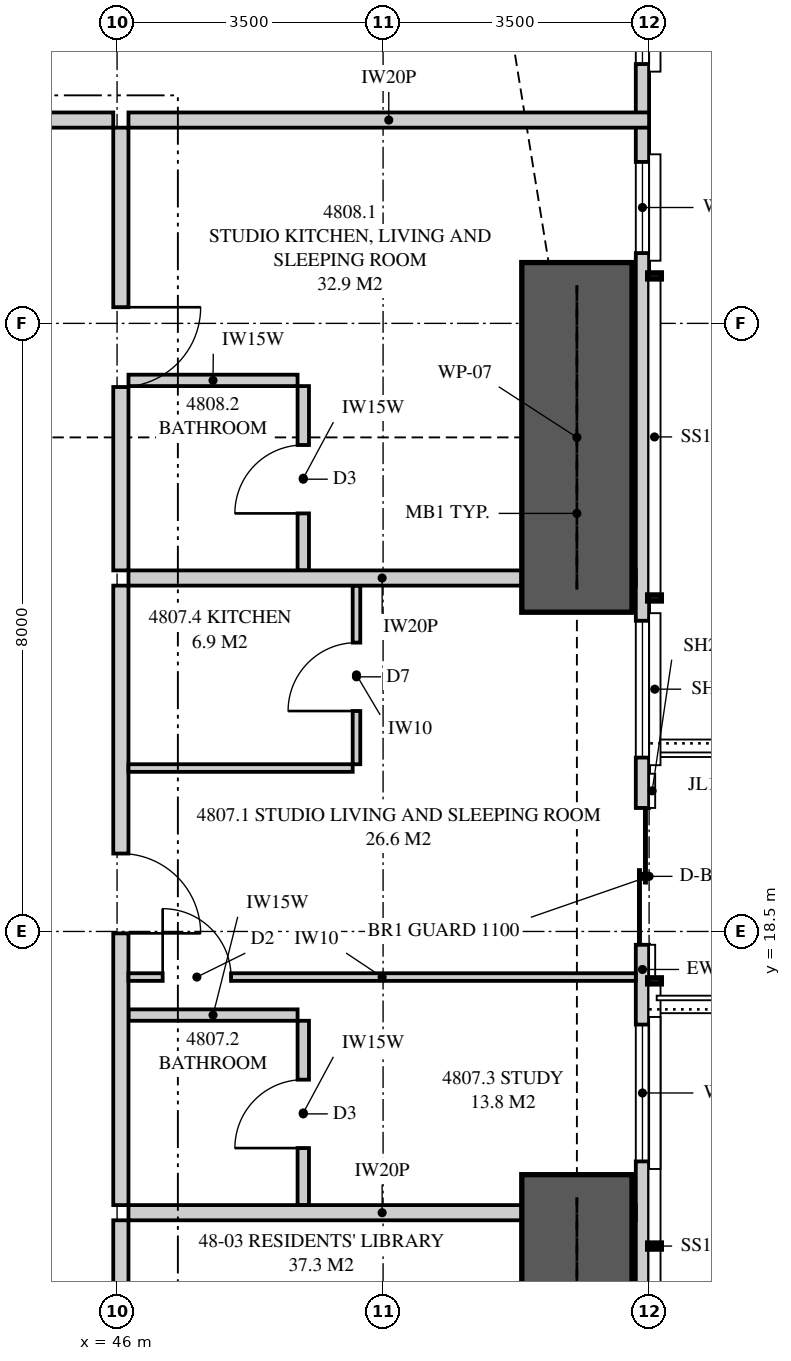
"""IFC4 building model, lengths in metres.
Left out: names, types, materials, properties, quantities, classifications, styles, units other than length and angle.
Written with IfcOpenShell. Run it as: python <this file> out.ifc"""

import sys

from ifc_helpers import new_model, si_unit, direction, frame, frame_2d, origin, place, context, subcontext, project, spatial, polyline, rectangle, outline, extrude, element, fill, save


model = new_model("IFC4")
c1 = context("Model", 3, precision=1e-05, world=origin(), true_north=direction((0.0, 1.0)))
c2 = subcontext(c1, "Body", "Model", "MODEL_VIEW")
j1 = project(units=[si_unit("LENGTHUNIT", "METRE"), si_unit("PLANEANGLEUNIT", "RADIAN")], contexts=[c1])
p1 = place(None, origin())
s1 = spatial("IfcSite", under=j1, at=p1, CompositionType="ELEMENT")
p2 = place(p1, origin())
s2 = spatial("IfcBuilding", under=s1, at=p2, CompositionType="ELEMENT")
p3 = place(p2, frame((0.0, 0.0, 177.8)))
s3 = spatial("IfcBuildingStorey", under=s2, at=p3, CompositionType="ELEMENT", Elevation=177.8)
p4 = place(p3, frame((52.913, 3.051, 0.0), z_axis=(0.0, 0.0, 1.0), x_axis=(0.0, 1.0, 0.0)))
e1 = element("IfcWall", 1, at=p4, inside=s3, PredefinedType="SOLIDWALL", context=c2, shape_type="SweptSolid", body=[
    extrude(outline(polyline([(0.0, 0.0), (29.897, 0.0), (29.897, 3.11), (22.167, 3.11), (22.167, 2.15), (22.074, 2.15), (22.074, 3.11), (21.949, 3.11), (21.949, 2.15), (9.949, 2.15), (9.949, 3.11), (9.847, 3.11), (9.847, 2.15), (9.706, 2.15), (9.706, 3.11), (0.0, 3.11), (0.0, 0.0)])), frame((0.0, 0.087, 0.0), z_axis=(0.0, -1.0, 0.0), x_axis=(1.0, 0.0, 0.0)), (0.0, 0.0, 1.0), 0.175),
])
p5 = place(p4, frame((1.797, 0.0, 0.4)))
e2 = element("IfcOpeningElement", 2, at=p5, cuts=e1, PredefinedType="OPENING", context=c2, shape_type="SweptSolid", body=[
    extrude(rectangle(XDim=1.8, YDim=1.7, at=frame_2d((0.9, 0.85))), frame((0.0, 0.097, 0.0), z_axis=(0.0, -1.0, 0.0), x_axis=(1.0, 0.0, 0.0)), (0.0, 0.0, 1.0), 0.195),
])
p6 = place(p4, frame((6.321, 0.0, 0.4)))
e3 = element("IfcOpeningElement", 3, at=p6, cuts=e1, PredefinedType="OPENING", context=c2, shape_type="SweptSolid", body=[
    extrude(rectangle(XDim=1.2, YDim=1.7, at=frame_2d((0.6, 0.85))), frame((0.0, 0.097, 0.0), z_axis=(0.0, -1.0, 0.0), x_axis=(1.0, 0.0, 0.0)), (0.0, 0.0, 1.0), 0.195),
])
p7 = place(p4, frame((12.424, 0.0, 0.4)))
e4 = element("IfcOpeningElement", 4, at=p7, cuts=e1, PredefinedType="OPENING", context=c2, shape_type="SweptSolid", body=[
    extrude(rectangle(XDim=1.8, YDim=1.7, at=frame_2d((0.9, 0.85))), frame((0.0, 0.097, 0.0), z_axis=(0.0, -1.0, 0.0), x_axis=(1.0, 0.0, 0.0)), (0.0, 0.0, 1.0), 0.195),
])
p8 = place(p4, frame((15.274, 0.0, 0.0)))
e5 = element("IfcOpeningElement", 5, at=p8, cuts=e1, PredefinedType="OPENING", context=c2, shape_type="SweptSolid", body=[
    extrude(rectangle(XDim=1.8, YDim=2.1, at=frame_2d((0.9, 1.05))), frame((0.0, 0.097, 0.0), z_axis=(0.0, -1.0, 0.0), x_axis=(1.0, 0.0, 0.0)), (0.0, 0.0, 1.0), 0.195),
])
p9 = place(p4, frame((17.736, 0.0, 0.4)))
e6 = element("IfcOpeningElement", 6, at=p9, cuts=e1, PredefinedType="OPENING", context=c2, shape_type="SweptSolid", body=[
    extrude(rectangle(XDim=1.8, YDim=1.7, at=frame_2d((0.9, 0.85))), frame((0.0, 0.097, 0.0), z_axis=(0.0, -1.0, 0.0), x_axis=(1.0, 0.0, 0.0)), (0.0, 0.0, 1.0), 0.195),
])
p10 = place(p4, frame((24.373, 0.0, 0.4)))
e7 = element("IfcOpeningElement", 7, at=p10, cuts=e1, PredefinedType="OPENING", context=c2, shape_type="SweptSolid", body=[
    extrude(rectangle(XDim=1.2, YDim=1.7, at=frame_2d((0.6, 0.85))), frame((0.0, 0.097, 0.0), z_axis=(0.0, -1.0, 0.0), x_axis=(1.0, 0.0, 0.0)), (0.0, 0.0, 1.0), 0.195),
])
p11 = place(p4, frame((26.861, 0.0, 0.4)))
e8 = element("IfcOpeningElement", 8, at=p11, cuts=e1, PredefinedType="OPENING", context=c2, shape_type="SweptSolid", body=[
    extrude(rectangle(XDim=2.4, YDim=1.7, at=frame_2d((1.2, 0.85))), frame((0.0, 0.097, 0.0), z_axis=(0.0, -1.0, 0.0), x_axis=(1.0, 0.0, 0.0)), (0.0, 0.0, 1.0), 0.195),
])
p12 = place(p3, frame((24.05, 29.175, 0.0), z_axis=(0.0, 0.0, 1.0), x_axis=(1.0, 0.0, 0.0)))
e9 = element("IfcWall", 9, at=p12, inside=s3, PredefinedType="PARTITIONING", context=c2, shape_type="SweptSolid", body=[
    extrude(outline(polyline([(0.0, 0.0), (21.9, 0.0), (21.9, 3.11), (19.037, 3.11), (19.037, 2.541), (18.363, 2.541), (18.363, 3.11), (8.787, 3.11), (8.787, 2.541), (8.113, 2.541), (8.113, 3.11), (0.0, 3.11), (0.0, 0.0)])), frame((0.0, 0.1, 0.0), z_axis=(0.0, -1.0, 0.0), x_axis=(1.0, 0.0, 0.0)), (0.0, 0.0, 1.0), 0.2),
])
p13 = place(p12, frame((13.925, 0.0, 0.0)))
e10 = element("IfcOpeningElement", 10, at=p13, cuts=e9, PredefinedType="OPENING", context=c2, shape_type="SweptSolid", body=[
    extrude(rectangle(XDim=1.05, YDim=2.2, at=frame_2d((0.525, 1.1))), frame((0.0, 0.11, 0.0), z_axis=(0.0, -1.0, 0.0), x_axis=(1.0, 0.0, 0.0)), (0.0, 0.0, 1.0), 0.22),
])
p14 = place(p3, frame((46.15, 29.175, 0.0), z_axis=(0.0, 0.0, 1.0), x_axis=(1.0, 0.0, 0.0)))
e11 = element("IfcWall", 11, at=p14, inside=s3, PredefinedType="PARTITIONING", context=c2, shape_type="SweptSolid", body=[
    extrude(outline(polyline([(0.0, 0.0), (6.85, 0.0), (6.85, 3.11), (6.147, 3.11), (6.147, 2.15), (4.303, 2.15), (4.303, 3.11), (0.0, 3.11), (0.0, 0.0)])), frame((0.0, 0.1, 0.0), z_axis=(0.0, -1.0, 0.0), x_axis=(1.0, 0.0, 0.0)), (0.0, 0.0, 1.0), 0.2),
])
p15 = place(p3, frame((52.825, 14.8, 0.0), z_axis=(0.0, 0.0, 1.0), x_axis=(-1.0, 0.0, 0.0)))
e12 = element("IfcWall", 12, at=p15, inside=s3, PredefinedType="PARTITIONING", context=c2, shape_type="SweptSolid", body=[
    extrude(outline(polyline([(0.529, 2.15), (0.0, 2.15), (0.0, 0.0), (0.529, 0.0), (0.529, 0.039), (1.021, 0.039), (1.021, 0.0), (6.675, 0.0), (6.675, 3.11), (1.685, 3.11), (1.685, 2.15), (1.021, 2.15), (1.021, 2.111), (0.529, 2.111), (0.529, 2.15)])), frame((0.0, 0.1, 0.0), z_axis=(0.0, -1.0, 0.0), x_axis=(1.0, 0.0, 0.0)), (0.0, 0.0, 1.0), 0.2),
])
p16 = place(p3, frame((52.825, 23.15, 0.0), z_axis=(0.0, 0.0, 1.0), x_axis=(-1.0, 0.0, 0.0)))
e13 = element("IfcWall", 13, at=p16, inside=s3, PredefinedType="PARTITIONING", context=c2, shape_type="SweptSolid", body=[
    extrude(outline(polyline([(0.0, 0.0), (6.675, 0.0), (6.675, 3.11), (1.685, 3.11), (1.685, 2.15), (0.0, 2.15), (0.0, 3.11), (0.0, 0.0)])), frame((0.0, 0.1, 0.0), z_axis=(0.0, -1.0, 0.0), x_axis=(1.0, 0.0, 0.0)), (0.0, 0.0, 1.0), 0.2),
])
p17 = place(p3, frame((46.05, 14.9, 0.0), z_axis=(0.0, 0.0, 1.0), x_axis=(0.0, 1.0, 0.0)))
e14 = element("IfcWall", 14, at=p17, inside=s3, PredefinedType="PARTITIONING", context=c2, shape_type="SweptSolid", body=[
    extrude(rectangle(XDim=8.15, YDim=0.2, at=frame_2d((4.075, 0.0))), origin(), (0.0, 0.0, 1.0), 3.11),
])
p18 = place(p17, frame((3.575, 0.0, 0.0)))
e15 = element("IfcOpeningElement", 15, at=p18, cuts=e14, PredefinedType="OPENING", context=c2, shape_type="SweptSolid", body=[
    extrude(rectangle(XDim=1.05, YDim=2.2, at=frame_2d((0.525, 1.1))), frame((0.0, 0.11, 0.0), z_axis=(0.0, -1.0, 0.0), x_axis=(1.0, 0.0, 0.0)), (0.0, 0.0, 1.0), 0.22),
])
p19 = place(p3, frame((48.45, 14.9, 0.0), z_axis=(0.0, 0.0, 1.0), x_axis=(0.0, 1.0, 0.0)))
e16 = element("IfcWall", 16, at=p19, inside=s3, PredefinedType="PLUMBINGWALL", context=c2, shape_type="SweptSolid", body=[
    extrude(rectangle(XDim=2.425, YDim=0.15, at=frame_2d((1.212, 0.0))), origin(), (0.0, 0.0, 1.0), 3.11),
])
p20 = place(p19, frame((0.75, 0.0, 0.0)))
e17 = element("IfcOpeningElement", 17, at=p20, cuts=e16, PredefinedType="OPENING", context=c2, shape_type="SweptSolid", body=[
    extrude(rectangle(XDim=0.9, YDim=2.1, at=frame_2d((0.45, 1.05))), frame((0.0, 0.085, 0.0), z_axis=(0.0, -1.0, 0.0), x_axis=(1.0, 0.0, 0.0)), (0.0, 0.0, 1.0), 0.17),
])
p21 = place(p3, frame((48.375, 17.4, 0.0), z_axis=(0.0, 0.0, 1.0), x_axis=(-1.0, 0.0, 0.0)))
e18 = element("IfcWall", 18, at=p21, inside=s3, PredefinedType="PLUMBINGWALL", context=c2, shape_type="SweptSolid", body=[
    extrude(rectangle(XDim=2.225, YDim=0.15, at=frame_2d((1.113, 0.0))), origin(), (0.0, 0.0, 1.0), 3.11),
])
p22 = place(p3, frame((52.825, 17.9, 0.0), z_axis=(0.0, 0.0, 1.0), x_axis=(-1.0, 0.0, 0.0)))
e19 = element("IfcWall", 19, at=p22, inside=s3, PredefinedType="PARTITIONING", context=c2, shape_type="SweptSolid", body=[
    extrude(outline(polyline([(0.0, 0.0), (6.675, 0.0), (6.675, 3.11), (1.635, 3.11), (1.635, 2.15), (0.0, 2.15), (0.0, 3.11), (0.0, 0.0)])), frame((0.0, 0.05, 0.0), z_axis=(0.0, -1.0, 0.0), x_axis=(1.0, 0.0, 0.0)), (0.0, 0.0, 1.0), 0.1),
])
p23 = place(p22, frame((5.325, 0.0, 0.0)))
e20 = element("IfcOpeningElement", 20, at=p23, cuts=e19, PredefinedType="OPENING", context=c2, shape_type="SweptSolid", body=[
    extrude(rectangle(XDim=0.9, YDim=2.1, at=frame_2d((0.45, 1.05))), frame((0.0, 0.06, 0.0), z_axis=(0.0, -1.0, 0.0), x_axis=(1.0, 0.0, 0.0)), (0.0, 0.0, 1.0), 0.12),
])
p24 = place(p3, frame((49.15, 20.7, 0.0), z_axis=(0.0, 0.0, 1.0), x_axis=(0.0, 1.0, 0.0)))
e21 = element("IfcWall", 21, at=p24, inside=s3, PredefinedType="PARTITIONING", context=c2, shape_type="SweptSolid", body=[
    extrude(rectangle(XDim=2.35, YDim=0.1, at=frame_2d((1.175, 0.0))), origin(), (0.0, 0.0, 1.0), 3.11),
])
p25 = place(p24, frame((0.7, 0.0, 0.0)))
e22 = element("IfcOpeningElement", 22, at=p25, cuts=e21, PredefinedType="OPENING", context=c2, shape_type="SweptSolid", body=[
    extrude(rectangle(XDim=0.9, YDim=2.1, at=frame_2d((0.45, 1.05))), frame((0.0, 0.06, 0.0), z_axis=(0.0, -1.0, 0.0), x_axis=(1.0, 0.0, 0.0)), (0.0, 0.0, 1.0), 0.12),
])
p26 = place(p3, frame((49.1, 20.65, 0.0), z_axis=(0.0, 0.0, 1.0), x_axis=(-1.0, 0.0, 0.0)))
e23 = element("IfcWall", 23, at=p26, inside=s3, PredefinedType="PARTITIONING", context=c2, shape_type="SweptSolid", body=[
    extrude(rectangle(XDim=2.95, YDim=0.1, at=frame_2d((1.475, 0.0))), origin(), (0.0, 0.0, 1.0), 3.11),
])
p27 = place(p3, frame((46.05, 23.25, 0.0), z_axis=(0.0, 0.0, 1.0), x_axis=(0.0, 1.0, 0.0)))
e24 = element("IfcWall", 24, at=p27, inside=s3, PredefinedType="PARTITIONING", context=c2, shape_type="SweptSolid", body=[
    extrude(outline(polyline([(0.0, 0.0), (5.825, 0.0), (5.825, 3.11), (2.087, 3.11), (2.087, 2.541), (1.413, 2.541), (1.413, 3.11), (0.0, 3.11), (0.0, 0.0)])), frame((0.0, 0.1, 0.0), z_axis=(0.0, -1.0, 0.0), x_axis=(1.0, 0.0, 0.0)), (0.0, 0.0, 1.0), 0.2),
])
p28 = place(p27, frame((2.413, 0.0, 0.0)))
e25 = element("IfcOpeningElement", 25, at=p28, cuts=e24, PredefinedType="OPENING", context=c2, shape_type="SweptSolid", body=[
    extrude(rectangle(XDim=1.05, YDim=2.2, at=frame_2d((0.525, 1.1))), frame((0.0, 0.11, 0.0), z_axis=(0.0, -1.0, 0.0), x_axis=(1.0, 0.0, 0.0)), (0.0, 0.0, 1.0), 0.22),
])
p29 = place(p3, frame((48.45, 23.25, 0.0), z_axis=(0.0, 0.0, 1.0), x_axis=(0.0, 1.0, 0.0)))
e26 = element("IfcWall", 26, at=p29, inside=s3, PredefinedType="PLUMBINGWALL", context=c2, shape_type="SweptSolid", body=[
    extrude(outline(polyline([(0.0, 0.0), (2.425, 0.0), (2.425, 3.11), (2.062, 3.11), (2.062, 2.541), (1.438, 2.541), (1.438, 3.11), (0.0, 3.11), (0.0, 0.0)])), frame((0.0, 0.075, 0.0), z_axis=(0.0, -1.0, 0.0), x_axis=(1.0, 0.0, 0.0)), (0.0, 0.0, 1.0), 0.15),
])
p30 = place(p29, frame((0.75, 0.0, 0.0)))
e27 = element("IfcOpeningElement", 27, at=p30, cuts=e26, PredefinedType="OPENING", context=c2, shape_type="SweptSolid", body=[
    extrude(rectangle(XDim=0.9, YDim=2.1, at=frame_2d((0.45, 1.05))), frame((0.0, 0.085, 0.0), z_axis=(0.0, -1.0, 0.0), x_axis=(1.0, 0.0, 0.0)), (0.0, 0.0, 1.0), 0.17),
])
p31 = place(p3, frame((48.375, 25.75, 0.0), z_axis=(0.0, 0.0, 1.0), x_axis=(-1.0, 0.0, 0.0)))
e28 = element("IfcWall", 28, at=p31, inside=s3, PredefinedType="PLUMBINGWALL", context=c2, shape_type="SweptSolid", body=[
    extrude(rectangle(XDim=2.225, YDim=0.15, at=frame_2d((1.113, 0.0))), origin(), (0.0, 0.0, 1.0), 3.11),
])
p32 = place(p3, frame((46.05, 13.512, 0.0), z_axis=(0.0, 0.0, 1.0), x_axis=(0.0, 1.0, 0.0)))
e29 = element("IfcWall", 29, at=p32, inside=s3, PredefinedType="PARTITIONING", context=c2, shape_type="SweptSolid", body=[
    extrude(rectangle(XDim=1.188, YDim=0.2, at=frame_2d((0.594, 0.0))), origin(), (0.0, 0.0, 1.0), 3.11),
])
for number, where, z_axis, x_axis in (
    (30, (52.05, 10.7, 0.0), (0.0, 0.0, 1.0), (0.0, 1.0, 0.0)),
    (31, (52.05, 22.7, 0.0), (0.0, 0.0, 1.0), (0.0, 1.0, 0.0)),
):
    element("IfcWall", number, at=place(p3, frame(where, z_axis=z_axis, x_axis=x_axis)), inside=s3, PredefinedType="SHEAR", context=c2, shape_type="SweptSolid", body=[
        extrude(rectangle(XDim=4.6, YDim=1.45, at=frame_2d((2.3, 0.0))), origin(), (0.0, 0.0, 1.0), 3.35),
    ])
p33 = place(p7, origin())
e32 = element("IfcWindow", 32, at=p33, inside=s3, PartitioningType="SINGLE_PANEL", PredefinedType="WINDOW", context=c2, shape_type="SweptSolid", body=[
    extrude(rectangle(XDim=1.8, YDim=1.7, at=frame_2d((0.9, 0.85))), frame((0.0, 0.03, 0.0), z_axis=(0.0, -1.0, 0.0), x_axis=(1.0, 0.0, 0.0)), (0.0, 0.0, 1.0), 0.06),
])
fill(e4, e32)
p34 = place(p8, origin())
e33 = element("IfcDoor", 33, at=p34, inside=s3, OperationType="SLIDING_TO_LEFT", PredefinedType="DOOR", context=c2, shape_type="SweptSolid", body=[
    extrude(rectangle(XDim=1.8, YDim=2.1, at=frame_2d((0.9, 1.05))), frame((0.0, 0.025, 0.0), z_axis=(0.0, -1.0, 0.0), x_axis=(1.0, 0.0, 0.0)), (0.0, 0.0, 1.0), 0.05),
])
fill(e5, e33)
p35 = place(p9, origin())
e34 = element("IfcWindow", 34, at=p35, inside=s3, PartitioningType="SINGLE_PANEL", PredefinedType="WINDOW", context=c2, shape_type="SweptSolid", body=[
    extrude(rectangle(XDim=1.8, YDim=1.7, at=frame_2d((0.9, 0.85))), frame((0.0, 0.03, 0.0), z_axis=(0.0, -1.0, 0.0), x_axis=(1.0, 0.0, 0.0)), (0.0, 0.0, 1.0), 0.06),
])
fill(e6, e34)
p36 = place(p10, origin())
e35 = element("IfcWindow", 35, at=p36, inside=s3, PartitioningType="SINGLE_PANEL", PredefinedType="WINDOW", context=c2, shape_type="SweptSolid", body=[
    extrude(rectangle(XDim=1.2, YDim=1.7, at=frame_2d((0.6, 0.85))), frame((0.0, 0.03, 0.0), z_axis=(0.0, -1.0, 0.0), x_axis=(1.0, 0.0, 0.0)), (0.0, 0.0, 1.0), 0.06),
])
fill(e7, e35)
p37 = place(p11, origin())
e36 = element("IfcWindow", 36, at=p37, inside=s3, PartitioningType="SINGLE_PANEL", PredefinedType="WINDOW", context=c2, shape_type="SweptSolid", body=[
    extrude(rectangle(XDim=2.4, YDim=1.7, at=frame_2d((1.2, 0.85))), frame((0.0, 0.03, 0.0), z_axis=(0.0, -1.0, 0.0), x_axis=(1.0, 0.0, 0.0)), (0.0, 0.0, 1.0), 0.06),
])
fill(e8, e36)
p38 = place(p18, frame((1.05, 0.0, 0.0), z_axis=(0.0, 0.0, 1.0), x_axis=(-1.0, 0.0, 0.0)))
e37 = element("IfcDoor", 37, at=p38, inside=s3, OperationType="SINGLE_SWING_RIGHT", PredefinedType="DOOR", context=c2, shape_type="SweptSolid", body=[
    extrude(rectangle(XDim=1.05, YDim=2.2, at=frame_2d((0.525, 1.1))), frame((0.0, 0.025, 0.0), z_axis=(0.0, -1.0, 0.0), x_axis=(1.0, 0.0, 0.0)), (0.0, 0.0, 1.0), 0.05),
])
fill(e15, e37)
p39 = place(p20, origin())
e38 = element("IfcDoor", 38, at=p39, inside=s3, OperationType="SINGLE_SWING_LEFT", PredefinedType="DOOR", context=c2, shape_type="SweptSolid", body=[
    extrude(rectangle(XDim=0.9, YDim=2.1, at=frame_2d((0.45, 1.05))), frame((0.0, 0.025, 0.0), z_axis=(0.0, -1.0, 0.0), x_axis=(1.0, 0.0, 0.0)), (0.0, 0.0, 1.0), 0.05),
])
fill(e17, e38)
p40 = place(p23, frame((0.9, 0.0, 0.0), z_axis=(0.0, 0.0, 1.0), x_axis=(-1.0, 0.0, 0.0)))
e39 = element("IfcDoor", 39, at=p40, inside=s3, OperationType="SINGLE_SWING_LEFT", PredefinedType="DOOR", context=c2, shape_type="SweptSolid", body=[
    extrude(rectangle(XDim=0.9, YDim=2.1, at=frame_2d((0.45, 1.05))), frame((0.0, 0.025, 0.0), z_axis=(0.0, -1.0, 0.0), x_axis=(1.0, 0.0, 0.0)), (0.0, 0.0, 1.0), 0.05),
])
fill(e20, e39)
p41 = place(p25, origin())
e40 = element("IfcDoor", 40, at=p41, inside=s3, OperationType="SINGLE_SWING_LEFT", PredefinedType="DOOR", context=c2, shape_type="SweptSolid", body=[
    extrude(rectangle(XDim=0.9, YDim=2.1, at=frame_2d((0.45, 1.05))), frame((0.0, 0.025, 0.0), z_axis=(0.0, -1.0, 0.0), x_axis=(1.0, 0.0, 0.0)), (0.0, 0.0, 1.0), 0.05),
])
fill(e22, e40)
p42 = place(p28, frame((1.05, 0.0, 0.0), z_axis=(0.0, 0.0, 1.0), x_axis=(-1.0, 0.0, 0.0)))
e41 = element("IfcDoor", 41, at=p42, inside=s3, OperationType="SINGLE_SWING_LEFT", PredefinedType="DOOR", context=c2, shape_type="SweptSolid", body=[
    extrude(rectangle(XDim=1.05, YDim=2.2, at=frame_2d((0.525, 1.1))), frame((0.0, 0.025, 0.0), z_axis=(0.0, -1.0, 0.0), x_axis=(1.0, 0.0, 0.0)), (0.0, 0.0, 1.0), 0.05),
])
fill(e25, e41)
p43 = place(p30, origin())
e42 = element("IfcDoor", 42, at=p43, inside=s3, OperationType="SINGLE_SWING_LEFT", PredefinedType="DOOR", context=c2, shape_type="SweptSolid", body=[
    extrude(rectangle(XDim=0.9, YDim=2.1, at=frame_2d((0.45, 1.05))), frame((0.0, 0.025, 0.0), z_axis=(0.0, -1.0, 0.0), x_axis=(1.0, 0.0, 0.0)), (0.0, 0.0, 1.0), 0.05),
])
fill(e27, e42)
save(model, sys.argv[1])
